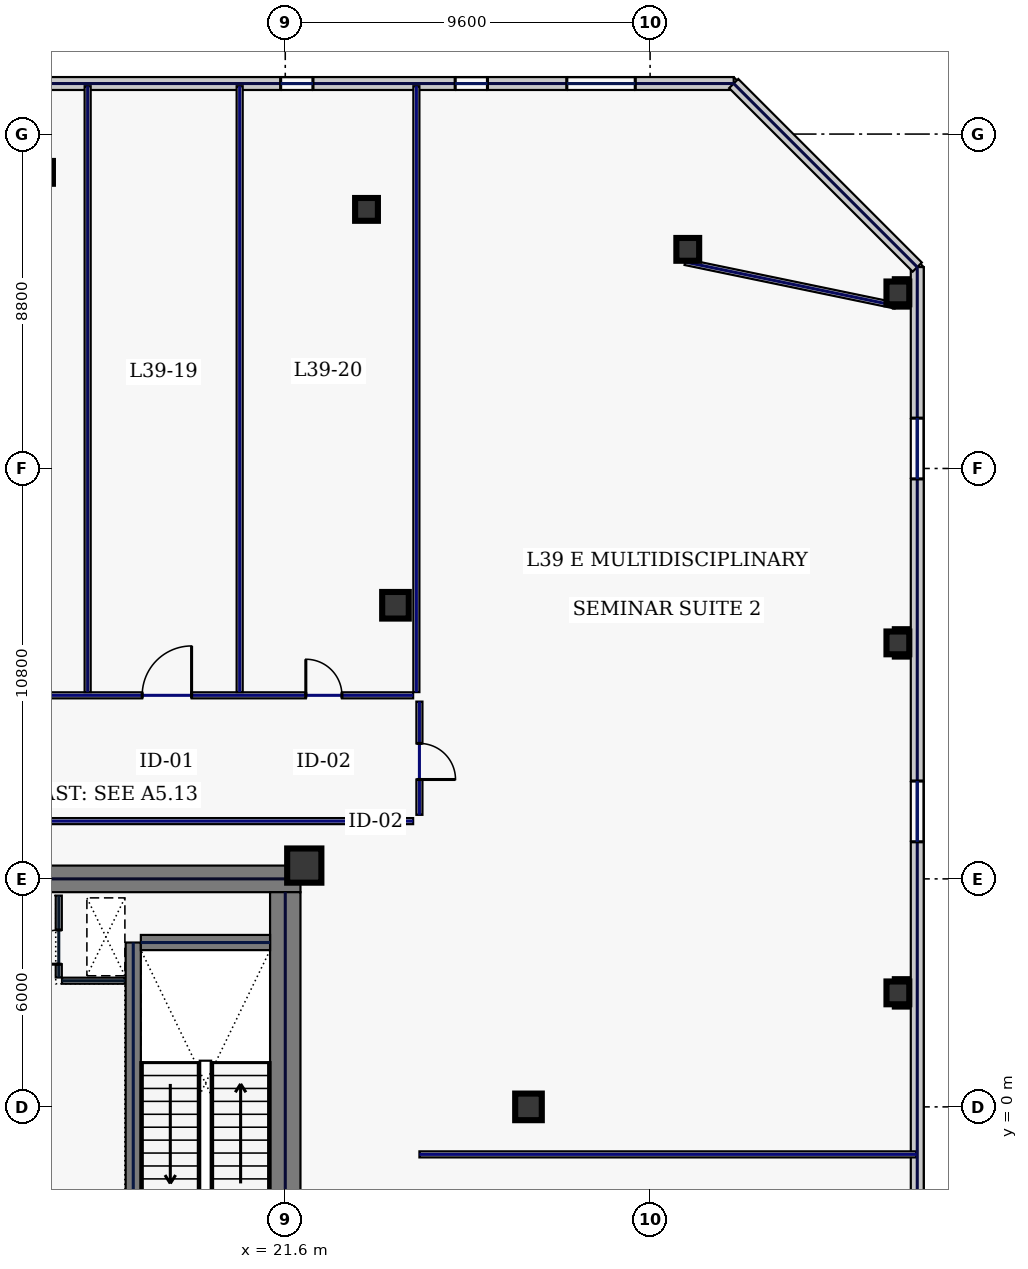
"""IFC4 building model, lengths in metres.
Left out: names, types, materials, properties, quantities, classifications, styles, units other than length and angle.
Written with IfcOpenShell. Run it as: python <this file> out.ifc"""

import sys

from ifc_helpers import new_model, si_unit, direction, frame, frame_2d, origin, origin_2d, place, context, subcontext, project, spatial, rectangle, hollow_rectangle, extrude, element, fill, save


model = new_model("IFC4")
c1 = context("Model", 3, precision=1e-05, world=origin(), true_north=direction((0.0, 1.0)))
c2 = subcontext(c1, "Body", "Model", "MODEL_VIEW")
j1 = project(units=[si_unit("LENGTHUNIT", "METRE"), si_unit("PLANEANGLEUNIT", "RADIAN")], contexts=[c1])
p1 = place(None, origin())
s1 = spatial("IfcSite", under=j1, at=p1, CompositionType="ELEMENT")
p2 = place(p1, origin())
s2 = spatial("IfcBuilding", under=s1, at=p2, CompositionType="ELEMENT")
p3 = place(p2, frame((0.0, 0.0, 172.2)))
s3 = spatial("IfcBuildingStorey", under=s2, at=p3, CompositionType="ELEMENT", Elevation=172.2)
p4 = place(p3, frame((10.45, 6.0, 0.0), z_axis=(0.0, 0.0, 1.0), x_axis=(1.0, 0.0, 0.0)))
e1 = element("IfcWall", 1, at=p4, inside=s3, PredefinedType="SHEAR", context=c2, shape_type="SweptSolid", body=[
    extrude(rectangle(XDim=11.55, YDim=0.7, at=frame_2d((5.775, 0.0))), origin(), (0.0, 0.0, 1.0), 3.74),
])
p5 = place(p3, frame((21.6, -5.65, 0.0), z_axis=(0.0, 0.0, 1.0), x_axis=(0.0, 1.0, 0.0)))
e2 = element("IfcWall", 2, at=p5, inside=s3, PredefinedType="SHEAR", context=c2, shape_type="SweptSolid", body=[
    extrude(rectangle(XDim=11.3, YDim=0.8, at=frame_2d((5.65, 0.0))), origin(), (0.0, 0.0, 1.0), 3.74),
])
p6 = place(p3, frame((17.6, -4.325, 0.0), z_axis=(0.0, 0.0, 1.0), x_axis=(0.0, 1.0, 0.0)))
e3 = element("IfcWall", 3, at=p6, inside=s3, PredefinedType="SHEAR", context=c2, shape_type="SweptSolid", body=[
    extrude(rectangle(XDim=8.65, YDim=0.4, at=frame_2d((4.325, 0.0))), origin(), (0.0, 0.0, 1.0), 3.74),
])
p7 = place(p6, frame((0.25, 0.0, 0.0)))
e4 = element("IfcOpeningElement", 4, at=p7, cuts=e3, PredefinedType="OPENING", context=c2, shape_type="SweptSolid", body=[
    extrude(rectangle(XDim=1.1, YDim=2.2, at=frame_2d((0.55, 1.1))), frame((0.0, 0.21, 0.0), z_axis=(0.0, -1.0, 0.0), x_axis=(1.0, 0.0, 0.0)), (0.0, 0.0, 1.0), 0.42),
])
p8 = place(p3, frame((17.8, 4.325, 0.0), z_axis=(0.0, 0.0, 1.0), x_axis=(1.0, 0.0, 0.0)))
e5 = element("IfcWall", 5, at=p8, inside=s3, PredefinedType="SHEAR", context=c2, shape_type="SweptSolid", body=[
    extrude(rectangle(XDim=3.4, YDim=0.4, at=frame_2d((1.7, 0.0))), origin(), (0.0, 0.0, 1.0), 3.74),
])
p9 = place(p3, frame((22.1, 6.35, 0.0), z_axis=(0.0, 0.0, 1.0), x_axis=(1.0, 0.0, 0.0)))
e6 = element("IfcColumn", 6, at=p9, inside=s3, PredefinedType="COLUMN", context=c2, shape_type="SweptSolid", body=[
    extrude(hollow_rectangle(XDim=0.9, YDim=0.9, WallThickness=0.04, at=origin_2d()), origin(), (0.0, 0.0, 1.0), 3.74),
])
for number, where, z_axis, x_axis in (
    (7, (24.5, 13.2, 0.0), (0.0, 0.0, 1.0), (1.0, 0.0, 0.0)),
    (8, (28.0, 0.0, 0.0), (0.0, 0.0, 1.0), (1.0, 0.0, 0.0)),
):
    element("IfcColumn", number, at=place(p3, frame(where, z_axis=z_axis, x_axis=x_axis)), inside=s3, PredefinedType="COLUMN", context=c2, shape_type="SweptSolid", body=[
        extrude(hollow_rectangle(XDim=0.7, YDim=0.7, WallThickness=0.032, at=origin_2d()), origin(), (0.0, 0.0, 1.0), 3.74),
    ])
for number, where, z_axis, x_axis in (
    (9, (32.191, 22.566, 0.0), (0.0, 0.0, 1.0), (1.0, 0.0, 0.0)),
    (10, (23.738, 23.618, 0.0), (0.0, 0.0, 1.0), (1.0, 0.0, 0.0)),
    (11, (15.186, 24.592, 0.0), (0.0, 0.0, 1.0), (1.0, 0.0, 0.0)),
    (12, (37.72, 3.0, 0.0), (0.0, 0.0, 1.0), (1.0, 0.0, 0.0)),
    (13, (37.72, 12.21, 0.0), (0.0, 0.0, 1.0), (1.0, 0.0, 0.0)),
    (14, (37.72, 21.42, 0.0), (0.0, 0.0, 1.0), (1.0, 0.0, 0.0)),
):
    element("IfcColumn", number, at=place(p3, frame(where, z_axis=z_axis, x_axis=x_axis)), inside=s3, PredefinedType="COLUMN", context=c2, shape_type="SweptSolid", body=[
        extrude(hollow_rectangle(XDim=0.6, YDim=0.6, WallThickness=0.028, at=origin_2d()), origin(), (0.0, 0.0, 1.0), 3.74),
    ])
p10 = place(p3, frame((33.4, 26.93, 0.0), z_axis=(0.0, 0.0, 1.0), x_axis=(-1.0, 0.0, 0.0)))
e15 = element("IfcWall", 15, at=p10, inside=s3, PredefinedType="STANDARD", context=c2, shape_type="SweptSolid", body=[
    extrude(rectangle(XDim=20.09, YDim=0.34, at=frame_2d((10.045, 0.0))), origin(), (0.0, 0.0, 1.0), 3.74),
])
p11 = place(p10, frame((11.071, 0.0, 0.7)))
e16 = element("IfcOpeningElement", 16, at=p11, cuts=e15, PredefinedType="OPENING", context=c2, shape_type="SweptSolid", body=[
    extrude(rectangle(XDim=0.85, YDim=1.85, at=frame_2d((0.425, 0.925))), frame((0.0, 0.18, 0.0), z_axis=(0.0, -1.0, 0.0), x_axis=(1.0, 0.0, 0.0)), (0.0, 0.0, 1.0), 0.36),
])
p12 = place(p10, frame((6.48, 0.0, 0.7)))
e17 = element("IfcOpeningElement", 17, at=p12, cuts=e15, PredefinedType="OPENING", context=c2, shape_type="SweptSolid", body=[
    extrude(rectangle(XDim=0.85, YDim=1.85, at=frame_2d((0.425, 0.925))), frame((0.0, 0.18, 0.0), z_axis=(0.0, -1.0, 0.0), x_axis=(1.0, 0.0, 0.0)), (0.0, 0.0, 1.0), 0.36),
])
p13 = place(p10, frame((2.591, 0.0, 0.7)))
e18 = element("IfcOpeningElement", 18, at=p13, cuts=e15, PredefinedType="OPENING", context=c2, shape_type="SweptSolid", body=[
    extrude(rectangle(XDim=1.8, YDim=2.2, at=frame_2d((0.9, 1.1))), frame((0.0, 0.18, 0.0), z_axis=(0.0, -1.0, 0.0), x_axis=(1.0, 0.0, 0.0)), (0.0, 0.0, 1.0), 0.36),
])
p14 = place(p3, frame((38.23, -16.1, 0.0), z_axis=(0.0, 0.0, 1.0), x_axis=(0.0, 1.0, 0.0)))
e19 = element("IfcWall", 19, at=p14, inside=s3, PredefinedType="STANDARD", context=c2, shape_type="SweptSolid", body=[
    extrude(rectangle(XDim=38.2, YDim=0.34, at=frame_2d((19.1, 0.0))), origin(), (0.0, 0.0, 1.0), 3.74),
])
p15 = place(p14, frame((3.975, 0.0, 0.22)))
e20 = element("IfcOpeningElement", 20, at=p15, cuts=e19, PredefinedType="OPENING", context=c2, shape_type="SweptSolid", body=[
    extrude(rectangle(XDim=1.6, YDim=1.2, at=frame_2d((0.8, 0.6))), frame((0.0, 0.18, 0.0), z_axis=(0.0, -1.0, 0.0), x_axis=(1.0, 0.0, 0.0)), (0.0, 0.0, 1.0), 0.36),
])
p16 = place(p14, frame((23.075, 0.0, 0.22)))
e21 = element("IfcOpeningElement", 21, at=p16, cuts=e19, PredefinedType="OPENING", context=c2, shape_type="SweptSolid", body=[
    extrude(rectangle(XDim=1.6, YDim=1.2, at=frame_2d((0.8, 0.6))), frame((0.0, 0.18, 0.0), z_axis=(0.0, -1.0, 0.0), x_axis=(1.0, 0.0, 0.0)), (0.0, 0.0, 1.0), 0.36),
])
p17 = place(p14, frame((32.625, 0.0, 0.22)))
e22 = element("IfcOpeningElement", 22, at=p17, cuts=e19, PredefinedType="OPENING", context=c2, shape_type="SweptSolid", body=[
    extrude(rectangle(XDim=1.6, YDim=1.2, at=frame_2d((0.8, 0.6))), frame((0.0, 0.18, 0.0), z_axis=(0.0, -1.0, 0.0), x_axis=(1.0, 0.0, 0.0)), (0.0, 0.0, 1.0), 0.36),
])
p18 = place(p3, frame((38.23, 22.1, 0.0), z_axis=(0.0, 0.0, 1.0), x_axis=(-0.707124652085, 0.707088909836, 0.0)))
e23 = element("IfcWall", 23, at=p18, inside=s3, PredefinedType="STANDARD", context=c2, shape_type="SweptSolid", body=[
    extrude(rectangle(XDim=6.831, YDim=0.34, at=frame_2d((3.415, 0.0))), origin(), (0.0, 0.0, 1.0), 3.74),
])
p19 = place(p3, frame((15.64, 3.405, 0.0), z_axis=(0.0, 0.0, 1.0), x_axis=(0.0, 1.0, 0.0)))
e24 = element("IfcWall", 24, at=p19, inside=s3, PredefinedType="PARTITIONING", context=c2, shape_type="SweptSolid", body=[
    extrude(rectangle(XDim=2.155, YDim=0.16, at=frame_2d((1.078, 0.0))), origin(), (0.0, 0.0, 1.0), 3.74),
])
p20 = place(p19, frame((0.35, 0.0, 0.0)))
e25 = element("IfcOpeningElement", 25, at=p20, cuts=e24, PredefinedType="OPENING", context=c2, shape_type="SweptSolid", body=[
    extrude(rectangle(XDim=0.9, YDim=2.2, at=frame_2d((0.45, 1.1))), frame((0.0, 0.09, 0.0), z_axis=(0.0, -1.0, 0.0), x_axis=(1.0, 0.0, 0.0)), (0.0, 0.0, 1.0), 0.18),
])
p21 = place(p3, frame((15.725, 3.32, 0.0), z_axis=(0.0, 0.0, 1.0), x_axis=(1.0, 0.0, 0.0)))
e26 = element("IfcWall", 26, at=p21, inside=s3, PredefinedType="PARTITIONING", context=c2, shape_type="SweptSolid", body=[
    extrude(rectangle(XDim=1.655, YDim=0.16, at=frame_2d((0.827, 0.0))), origin(), (0.0, 0.0, 1.0), 3.74),
])
p22 = place(p3, frame((37.651, 21.087, 0.0), z_axis=(0.0, 0.0, 1.0), x_axis=(-0.979184618318, 0.202971631636, 0.0)))
e27 = element("IfcWall", 27, at=p22, inside=s3, PredefinedType="PARTITIONING", context=c2, shape_type="SweptSolid", body=[
    extrude(rectangle(XDim=5.646, YDim=0.16, at=frame_2d((2.823, 0.0))), origin(), (0.0, 0.0, 1.0), 1.535),
])
p23 = place(p3, frame((-24.965, 10.83, 0.0), z_axis=(0.0, 0.0, 1.0), x_axis=(1.0, 0.0, 0.0)))
e28 = element("IfcWall", 28, at=p23, inside=s3, PredefinedType="PARTITIONING", context=c2, shape_type="SweptSolid", body=[
    extrude(rectangle(XDim=49.93, YDim=0.16, at=frame_2d((24.965, 0.0))), origin(), (0.0, 0.0, 1.0), 3.74),
])
p24 = place(p23, frame((2.044, 0.0, 0.0)))
e29 = element("IfcOpeningElement", 29, at=p24, cuts=e28, PredefinedType="OPENING", context=c2, shape_type="SweptSolid", body=[
    extrude(rectangle(XDim=1.05, YDim=2.2, at=frame_2d((0.525, 1.1))), frame((0.0, 0.09, 0.0), z_axis=(0.0, -1.0, 0.0), x_axis=(1.0, 0.0, 0.0)), (0.0, 0.0, 1.0), 0.18),
])
p25 = place(p23, frame((7.33, 0.0, 0.0)))
e30 = element("IfcOpeningElement", 30, at=p25, cuts=e28, PredefinedType="OPENING", context=c2, shape_type="SweptSolid", body=[
    extrude(rectangle(XDim=0.95, YDim=2.2, at=frame_2d((0.475, 1.1))), frame((0.0, 0.09, 0.0), z_axis=(0.0, -1.0, 0.0), x_axis=(1.0, 0.0, 0.0)), (0.0, 0.0, 1.0), 0.18),
])
p26 = place(p23, frame((12.43, 0.0, 0.0)))
e31 = element("IfcOpeningElement", 31, at=p26, cuts=e28, PredefinedType="OPENING", context=c2, shape_type="SweptSolid", body=[
    extrude(rectangle(XDim=0.95, YDim=2.2, at=frame_2d((0.475, 1.1))), frame((0.0, 0.09, 0.0), z_axis=(0.0, -1.0, 0.0), x_axis=(1.0, 0.0, 0.0)), (0.0, 0.0, 1.0), 0.18),
])
p27 = place(p23, frame((18.875, 0.0, 0.0)))
e32 = element("IfcOpeningElement", 32, at=p27, cuts=e28, PredefinedType="OPENING", context=c2, shape_type="SweptSolid", body=[
    extrude(rectangle(XDim=1.3, YDim=2.2, at=frame_2d((0.65, 1.1))), frame((0.0, 0.09, 0.0), z_axis=(0.0, -1.0, 0.0), x_axis=(1.0, 0.0, 0.0)), (0.0, 0.0, 1.0), 0.18),
])
p28 = place(p23, frame((27.225, 0.0, 0.0)))
e33 = element("IfcOpeningElement", 33, at=p28, cuts=e28, PredefinedType="OPENING", context=c2, shape_type="SweptSolid", body=[
    extrude(rectangle(XDim=0.95, YDim=2.2, at=frame_2d((0.475, 1.1))), frame((0.0, 0.09, 0.0), z_axis=(0.0, -1.0, 0.0), x_axis=(1.0, 0.0, 0.0)), (0.0, 0.0, 1.0), 0.18),
])
p29 = place(p23, frame((33.153, 0.0, 0.0)))
e34 = element("IfcOpeningElement", 34, at=p29, cuts=e28, PredefinedType="OPENING", context=c2, shape_type="SweptSolid", body=[
    extrude(rectangle(XDim=1.05, YDim=2.2, at=frame_2d((0.525, 1.1))), frame((0.0, 0.09, 0.0), z_axis=(0.0, -1.0, 0.0), x_axis=(1.0, 0.0, 0.0)), (0.0, 0.0, 1.0), 0.18),
])
p30 = place(p23, frame((38.637, 0.0, 0.0)))
e35 = element("IfcOpeningElement", 35, at=p30, cuts=e28, PredefinedType="OPENING", context=c2, shape_type="SweptSolid", body=[
    extrude(rectangle(XDim=1.15, YDim=2.2, at=frame_2d((0.575, 1.1))), frame((0.0, 0.09, 0.0), z_axis=(0.0, -1.0, 0.0), x_axis=(1.0, 0.0, 0.0)), (0.0, 0.0, 1.0), 0.18),
])
p31 = place(p23, frame((42.8, 0.0, 0.0)))
e36 = element("IfcOpeningElement", 36, at=p31, cuts=e28, PredefinedType="OPENING", context=c2, shape_type="SweptSolid", body=[
    extrude(rectangle(XDim=1.3, YDim=2.2, at=frame_2d((0.65, 1.1))), frame((0.0, 0.09, 0.0), z_axis=(0.0, -1.0, 0.0), x_axis=(1.0, 0.0, 0.0)), (0.0, 0.0, 1.0), 0.18),
])
p32 = place(p23, frame((47.106, 0.0, 0.0)))
e37 = element("IfcOpeningElement", 37, at=p32, cuts=e28, PredefinedType="OPENING", context=c2, shape_type="SweptSolid", body=[
    extrude(rectangle(XDim=0.95, YDim=2.2, at=frame_2d((0.475, 1.1))), frame((0.0, 0.09, 0.0), z_axis=(0.0, -1.0, 0.0), x_axis=(1.0, 0.0, 0.0)), (0.0, 0.0, 1.0), 0.18),
])
p33 = place(p3, frame((25.13, 10.665, 0.0), z_axis=(0.0, 0.0, 1.0), x_axis=(0.0, -1.0, 0.0)))
e38 = element("IfcWall", 38, at=p33, inside=s3, PredefinedType="PARTITIONING", context=c2, shape_type="SweptSolid", body=[
    extrude(rectangle(XDim=2.98, YDim=0.16, at=frame_2d((1.49, 0.0))), origin(), (0.0, 0.0, 1.0), 3.74),
])
p34 = place(p33, frame((1.1, 0.0, 0.0)))
e39 = element("IfcOpeningElement", 39, at=p34, cuts=e38, PredefinedType="OPENING", context=c2, shape_type="SweptSolid", body=[
    extrude(rectangle(XDim=0.95, YDim=2.2, at=frame_2d((0.475, 1.1))), frame((0.0, 0.09, 0.0), z_axis=(0.0, -1.0, 0.0), x_axis=(1.0, 0.0, 0.0)), (0.0, 0.0, 1.0), 0.18),
])
p35 = place(p3, frame((24.965, 7.52, 0.0), z_axis=(0.0, 0.0, 1.0), x_axis=(-1.0, 0.0, 0.0)))
e40 = element("IfcWall", 40, at=p35, inside=s3, PredefinedType="PARTITIONING", context=c2, shape_type="SweptSolid", body=[
    extrude(rectangle(XDim=14.25, YDim=0.16, at=frame_2d((7.125, 0.0))), origin(), (0.0, 0.0, 1.0), 3.74),
])
p36 = place(p3, frame((25.05, 10.915, 0.0), z_axis=(0.0, 0.0, 1.0), x_axis=(0.0, 1.0, 0.0)))
e41 = element("IfcWall", 41, at=p36, inside=s3, PredefinedType="PARTITIONING", context=c2, shape_type="SweptSolid", body=[
    extrude(rectangle(XDim=15.945, YDim=0.16, at=frame_2d((7.973, 0.0))), origin(), (0.0, 0.0, 1.0), 3.74),
])
p37 = place(p3, frame((16.4, 10.915, 0.0), z_axis=(0.0, 0.0, 1.0), x_axis=(0.0, 1.0, 0.0)))
e42 = element("IfcWall", 42, at=p37, inside=s3, PredefinedType="PARTITIONING", context=c2, shape_type="SweptSolid", body=[
    extrude(rectangle(XDim=15.945, YDim=0.16, at=frame_2d((7.973, 0.0))), origin(), (0.0, 0.0, 1.0), 1.535),
])
p38 = place(p3, frame((20.4, 10.915, 0.0), z_axis=(0.0, 0.0, 1.0), x_axis=(0.0, 1.0, 0.0)))
e43 = element("IfcWall", 43, at=p38, inside=s3, PredefinedType="PARTITIONING", context=c2, shape_type="SweptSolid", body=[
    extrude(rectangle(XDim=15.945, YDim=0.16, at=frame_2d((7.973, 0.0))), origin(), (0.0, 0.0, 1.0), 3.74),
])
p39 = place(p3, frame((25.13, -1.25, 0.0), z_axis=(0.0, 0.0, 1.0), x_axis=(1.0, 0.0, 0.0)))
e44 = element("IfcWall", 44, at=p39, inside=s3, PredefinedType="PARTITIONING", context=c2, shape_type="SweptSolid", body=[
    extrude(rectangle(XDim=13.08, YDim=0.16, at=frame_2d((6.54, 0.0))), origin(), (0.0, 0.0, 1.0), 3.74),
])
p40 = place(p11, origin())
e45 = element("IfcWindow", 45, at=p40, inside=s3, PartitioningType="SINGLE_PANEL", PredefinedType="WINDOW", context=c2, shape_type="SweptSolid", body=[
    extrude(rectangle(XDim=0.85, YDim=1.85, at=frame_2d((0.425, 0.925))), frame((0.0, 0.03, 0.0), z_axis=(0.0, -1.0, 0.0), x_axis=(1.0, 0.0, 0.0)), (0.0, 0.0, 1.0), 0.06),
])
fill(e16, e45)
p41 = place(p12, origin())
e46 = element("IfcWindow", 46, at=p41, inside=s3, PartitioningType="SINGLE_PANEL", PredefinedType="WINDOW", context=c2, shape_type="SweptSolid", body=[
    extrude(rectangle(XDim=0.85, YDim=1.85, at=frame_2d((0.425, 0.925))), frame((0.0, 0.03, 0.0), z_axis=(0.0, -1.0, 0.0), x_axis=(1.0, 0.0, 0.0)), (0.0, 0.0, 1.0), 0.06),
])
fill(e17, e46)
p42 = place(p13, origin())
e47 = element("IfcWindow", 47, at=p42, inside=s3, PartitioningType="SINGLE_PANEL", PredefinedType="WINDOW", context=c2, shape_type="SweptSolid", body=[
    extrude(rectangle(XDim=1.8, YDim=2.2, at=frame_2d((0.9, 1.1))), frame((0.0, 0.03, 0.0), z_axis=(0.0, -1.0, 0.0), x_axis=(1.0, 0.0, 0.0)), (0.0, 0.0, 1.0), 0.06),
])
fill(e18, e47)
p43 = place(p16, origin())
e48 = element("IfcWindow", 48, at=p43, inside=s3, PartitioningType="SINGLE_PANEL", PredefinedType="WINDOW", context=c2, shape_type="SweptSolid", body=[
    extrude(rectangle(XDim=1.6, YDim=1.2, at=frame_2d((0.8, 0.6))), frame((0.0, 0.03, 0.0), z_axis=(0.0, -1.0, 0.0), x_axis=(1.0, 0.0, 0.0)), (0.0, 0.0, 1.0), 0.06),
])
fill(e21, e48)
p44 = place(p17, origin())
e49 = element("IfcWindow", 49, at=p44, inside=s3, PartitioningType="SINGLE_PANEL", PredefinedType="WINDOW", context=c2, shape_type="SweptSolid", body=[
    extrude(rectangle(XDim=1.6, YDim=1.2, at=frame_2d((0.8, 0.6))), frame((0.0, 0.03, 0.0), z_axis=(0.0, -1.0, 0.0), x_axis=(1.0, 0.0, 0.0)), (0.0, 0.0, 1.0), 0.06),
])
fill(e22, e49)
p45 = place(p20, origin())
e50 = element("IfcDoor", 50, at=p45, inside=s3, OperationType="SINGLE_SWING_LEFT", PredefinedType="DOOR", context=c2, shape_type="SweptSolid", body=[
    extrude(rectangle(XDim=0.9, YDim=2.2, at=frame_2d((0.45, 1.1))), frame((0.0, 0.025, 0.0), z_axis=(0.0, -1.0, 0.0), x_axis=(1.0, 0.0, 0.0)), (0.0, 0.0, 1.0), 0.05),
])
fill(e25, e50)
p46 = place(p31, origin())
e51 = element("IfcDoor", 51, at=p46, inside=s3, OperationType="SINGLE_SWING_RIGHT", PredefinedType="DOOR", context=c2, shape_type="SweptSolid", body=[
    extrude(rectangle(XDim=1.3, YDim=2.2, at=frame_2d((0.65, 1.1))), frame((0.0, 0.025, 0.0), z_axis=(0.0, -1.0, 0.0), x_axis=(1.0, 0.0, 0.0)), (0.0, 0.0, 1.0), 0.05),
])
fill(e36, e51)
p47 = place(p32, origin())
e52 = element("IfcDoor", 52, at=p47, inside=s3, OperationType="SINGLE_SWING_LEFT", PredefinedType="DOOR", context=c2, shape_type="SweptSolid", body=[
    extrude(rectangle(XDim=0.95, YDim=2.2, at=frame_2d((0.475, 1.1))), frame((0.0, 0.025, 0.0), z_axis=(0.0, -1.0, 0.0), x_axis=(1.0, 0.0, 0.0)), (0.0, 0.0, 1.0), 0.05),
])
fill(e37, e52)
p48 = place(p34, origin())
e53 = element("IfcDoor", 53, at=p48, inside=s3, OperationType="SINGLE_SWING_RIGHT", PredefinedType="DOOR", context=c2, shape_type="SweptSolid", body=[
    extrude(rectangle(XDim=0.95, YDim=2.2, at=frame_2d((0.475, 1.1))), frame((0.0, 0.025, 0.0), z_axis=(0.0, -1.0, 0.0), x_axis=(1.0, 0.0, 0.0)), (0.0, 0.0, 1.0), 0.05),
])
fill(e39, e53)
save(model, sys.argv[1])
